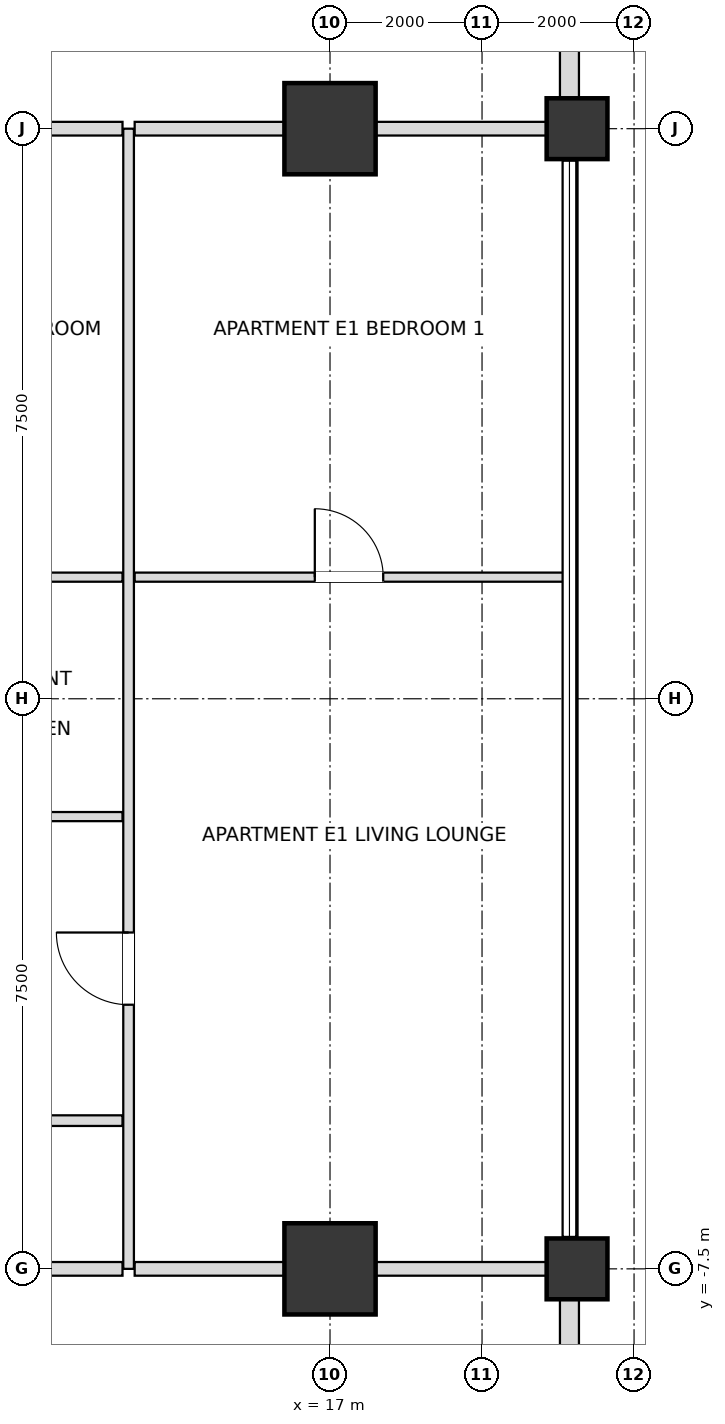
"""IFC4 building model, lengths in metres.
Left out: names, types, materials, properties, quantities, classifications, styles, units other than length and angle.
Written with IfcOpenShell. Run it as: python <this file> out.ifc"""

import sys

from ifc_helpers import new_model, si_unit, direction, frame, frame_2d, origin, origin_2d, place, context, subcontext, project, spatial, rectangle, extrude, element, fill, save


model = new_model("IFC4")
c1 = context("Model", 3, precision=1e-05, world=origin(), true_north=direction((0.0, 1.0)))
c2 = subcontext(c1, "Body", "Model", "MODEL_VIEW")
j1 = project(units=[si_unit("LENGTHUNIT", "METRE"), si_unit("PLANEANGLEUNIT", "RADIAN")], contexts=[c1])
p1 = place(None, origin())
s1 = spatial("IfcSite", under=j1, at=p1, CompositionType="ELEMENT")
p2 = place(p1, origin())
s2 = spatial("IfcBuilding", under=s1, at=p2, CompositionType="ELEMENT")
p3 = place(p2, frame((0.0, 0.0, 106.2)))
s3 = spatial("IfcBuildingStorey", under=s2, at=p3, CompositionType="ELEMENT", Elevation=106.2)
for number, where, z_axis, x_axis in (
    (1, (17.0, -7.5, 0.0), (0.0, 0.0, 1.0), (1.0, 0.0, 0.0)),
    (2, (17.0, 7.5, 0.0), (0.0, 0.0, 1.0), (1.0, 0.0, 0.0)),
):
    element("IfcColumn", number, at=place(p3, frame(where, z_axis=z_axis, x_axis=x_axis)), inside=s3, PredefinedType="USERDEFINED", context=c2, shape_type="SweptSolid", body=[
        extrude(rectangle(XDim=1.2, YDim=1.2, at=origin_2d()), origin(), (0.0, 0.0, 1.0), 3.6),
    ])
for number, where, z_axis, x_axis in (
    (3, (20.25, -7.5, 0.0), (0.0, 0.0, 1.0), (1.0, 0.0, 0.0)),
    (4, (20.25, 7.5, 0.0), (0.0, 0.0, 1.0), (1.0, 0.0, 0.0)),
):
    element("IfcColumn", number, at=place(p3, frame(where, z_axis=z_axis, x_axis=x_axis)), inside=s3, PredefinedType="COLUMN", context=c2, shape_type="SweptSolid", body=[
        extrude(rectangle(XDim=0.8, YDim=0.8, at=origin_2d()), origin(), (0.0, 0.0, 1.0), 3.6),
    ])
p4 = place(p3, frame((20.15, -12.605, 0.0), z_axis=(0.0, 0.0, 1.0), x_axis=(0.0, 1.0, 0.0)))
e5 = element("IfcWall", 5, at=p4, inside=s3, PredefinedType="SOLIDWALL", context=c2, shape_type="SweptSolid", body=[
    extrude(rectangle(XDim=4.71, YDim=0.25, at=frame_2d((2.355, 0.0))), origin(), (0.0, 0.0, 1.0), 2.736),
])
p5 = place(p4, frame((1.455, 0.0, 0.72)))
e6 = element("IfcOpeningElement", 6, at=p5, cuts=e5, PredefinedType="OPENING", context=c2, shape_type="SweptSolid", body=[
    extrude(rectangle(XDim=1.8, YDim=1.68, at=frame_2d((0.9, 0.84))), frame((0.0, 0.135, 0.0), z_axis=(0.0, -1.0, 0.0), x_axis=(1.0, 0.0, 0.0)), (0.0, 0.0, 1.0), 0.27),
])
p6 = place(p3, frame((20.15, 7.895, 0.0), z_axis=(0.0, 0.0, 1.0), x_axis=(0.0, 1.0, 0.0)))
e7 = element("IfcWall", 7, at=p6, inside=s3, PredefinedType="SOLIDWALL", context=c2, shape_type="SweptSolid", body=[
    extrude(rectangle(XDim=4.71, YDim=0.25, at=frame_2d((2.355, 0.0))), origin(), (0.0, 0.0, 1.0), 2.736),
])
p7 = place(p6, frame((1.455, 0.0, 0.72)))
e8 = element("IfcOpeningElement", 8, at=p7, cuts=e7, PredefinedType="OPENING", context=c2, shape_type="SweptSolid", body=[
    extrude(rectangle(XDim=1.8, YDim=1.68, at=frame_2d((0.9, 0.84))), frame((0.0, 0.135, 0.0), z_axis=(0.0, -1.0, 0.0), x_axis=(1.0, 0.0, 0.0)), (0.0, 0.0, 1.0), 0.27),
])
p8 = place(p3, frame((14.35, -7.5, 0.0), z_axis=(0.0, 0.0, 1.0), x_axis=(0.0, 1.0, 0.0)))
e9 = element("IfcWall", 9, at=p8, inside=s3, PredefinedType="PARTITIONING", context=c2, shape_type="SweptSolid", body=[
    extrude(rectangle(XDim=15.0, YDim=0.14, at=frame_2d((7.5, 0.0))), origin(), (0.0, 0.0, 1.0), 3.38),
])
p9 = place(p8, frame((3.475, 0.0, 0.0)))
e10 = element("IfcOpeningElement", 10, at=p9, cuts=e9, PredefinedType="OPENING", context=c2, shape_type="SweptSolid", body=[
    extrude(rectangle(XDim=0.95, YDim=2.1, at=frame_2d((0.475, 1.05))), frame((0.0, 0.08, 0.0), z_axis=(0.0, -1.0, 0.0), x_axis=(1.0, 0.0, 0.0)), (0.0, 0.0, 1.0), 0.16),
])
p10 = place(p3, frame((8.38, -7.5, 0.0), z_axis=(0.0, 0.0, 1.0), x_axis=(1.0, 0.0, 0.0)))
e11 = element("IfcWall", 11, at=p10, inside=s3, PredefinedType="PARTITIONING", context=c2, shape_type="SweptSolid", body=[
    extrude(rectangle(XDim=5.89, YDim=0.18, at=frame_2d((2.945, 0.0))), origin(), (0.0, 0.0, 1.0), 2.816),
])
p11 = place(p3, frame((14.43, -7.5, 0.0), z_axis=(0.0, 0.0, 1.0), x_axis=(1.0, 0.0, 0.0)))
e12 = element("IfcWall", 12, at=p11, inside=s3, PredefinedType="PARTITIONING", context=c2, shape_type="SweptSolid", body=[
    extrude(rectangle(XDim=5.72, YDim=0.18, at=frame_2d((2.86, 0.0))), origin(), (0.0, 0.0, 1.0), 2.816),
])
p12 = place(p3, frame((8.38, -5.55, 0.0), z_axis=(0.0, 0.0, 1.0), x_axis=(1.0, 0.0, 0.0)))
e13 = element("IfcWall", 13, at=p12, inside=s3, PredefinedType="PARTITIONING", context=c2, shape_type="SweptSolid", body=[
    extrude(rectangle(XDim=5.89, YDim=0.14, at=frame_2d((2.945, 0.0))), origin(), (0.0, 0.0, 1.0), 3.38),
])
p13 = place(p12, frame((2.49, 0.0, 0.0)))
e14 = element("IfcOpeningElement", 14, at=p13, cuts=e13, PredefinedType="OPENING", context=c2, shape_type="SweptSolid", body=[
    extrude(rectangle(XDim=0.9, YDim=2.1, at=frame_2d((0.45, 1.05))), frame((0.0, 0.08, 0.0), z_axis=(0.0, -1.0, 0.0), x_axis=(1.0, 0.0, 0.0)), (0.0, 0.0, 1.0), 0.16),
])
p14 = place(p3, frame((8.38, -1.55, 0.0), z_axis=(0.0, 0.0, 1.0), x_axis=(1.0, 0.0, 0.0)))
e15 = element("IfcWall", 15, at=p14, inside=s3, PredefinedType="PARTITIONING", context=c2, shape_type="SweptSolid", body=[
    extrude(rectangle(XDim=5.89, YDim=0.12, at=frame_2d((2.945, 0.0))), origin(), (0.0, 0.0, 1.0), 3.38),
])
p15 = place(p14, frame((2.465, 0.0, 0.0)))
e16 = element("IfcOpeningElement", 16, at=p15, cuts=e15, PredefinedType="OPENING", context=c2, shape_type="SweptSolid", body=[
    extrude(rectangle(XDim=0.95, YDim=2.1, at=frame_2d((0.475, 1.05))), frame((0.0, 0.07, 0.0), z_axis=(0.0, -1.0, 0.0), x_axis=(1.0, 0.0, 0.0)), (0.0, 0.0, 1.0), 0.14),
])
p16 = place(p3, frame((8.38, 1.6, 0.0), z_axis=(0.0, 0.0, 1.0), x_axis=(1.0, 0.0, 0.0)))
e17 = element("IfcWall", 17, at=p16, inside=s3, PredefinedType="PARTITIONING", context=c2, shape_type="SweptSolid", body=[
    extrude(rectangle(XDim=5.89, YDim=0.12, at=frame_2d((2.945, 0.0))), origin(), (0.0, 0.0, 1.0), 3.38),
])
p17 = place(p16, frame((2.49, 0.0, 0.0)))
e18 = element("IfcOpeningElement", 18, at=p17, cuts=e17, PredefinedType="OPENING", context=c2, shape_type="SweptSolid", body=[
    extrude(rectangle(XDim=0.9, YDim=2.1, at=frame_2d((0.45, 1.05))), frame((0.0, 0.07, 0.0), z_axis=(0.0, -1.0, 0.0), x_axis=(1.0, 0.0, 0.0)), (0.0, 0.0, 1.0), 0.14),
])
p18 = place(p3, frame((14.43, 1.6, 0.0), z_axis=(0.0, 0.0, 1.0), x_axis=(1.0, 0.0, 0.0)))
e19 = element("IfcWall", 19, at=p18, inside=s3, PredefinedType="PARTITIONING", context=c2, shape_type="SweptSolid", body=[
    extrude(rectangle(XDim=5.64, YDim=0.12, at=frame_2d((2.82, 0.0))), origin(), (0.0, 0.0, 1.0), 2.816),
])
p19 = place(p18, frame((2.37, 0.0, 0.0)))
e20 = element("IfcOpeningElement", 20, at=p19, cuts=e19, PredefinedType="OPENING", context=c2, shape_type="SweptSolid", body=[
    extrude(rectangle(XDim=0.9, YDim=2.1, at=frame_2d((0.45, 1.05))), frame((0.0, 0.07, 0.0), z_axis=(0.0, -1.0, 0.0), x_axis=(1.0, 0.0, 0.0)), (0.0, 0.0, 1.0), 0.14),
])
p20 = place(p3, frame((8.38, 7.5, 0.0), z_axis=(0.0, 0.0, 1.0), x_axis=(1.0, 0.0, 0.0)))
e21 = element("IfcWall", 21, at=p20, inside=s3, PredefinedType="PARTITIONING", context=c2, shape_type="SweptSolid", body=[
    extrude(rectangle(XDim=5.89, YDim=0.18, at=frame_2d((2.945, 0.0))), origin(), (0.0, 0.0, 1.0), 2.816),
])
p21 = place(p3, frame((14.43, 7.5, 0.0), z_axis=(0.0, 0.0, 1.0), x_axis=(1.0, 0.0, 0.0)))
e22 = element("IfcWall", 22, at=p21, inside=s3, PredefinedType="PARTITIONING", context=c2, shape_type="SweptSolid", body=[
    extrude(rectangle(XDim=5.72, YDim=0.18, at=frame_2d((2.86, 0.0))), origin(), (0.0, 0.0, 1.0), 2.816),
])
p22 = place(p9, origin())
e23 = element("IfcDoor", 23, at=p22, inside=s3, OperationType="SINGLE_SWING_RIGHT", PredefinedType="DOOR", context=c2, shape_type="SweptSolid", body=[
    extrude(rectangle(XDim=0.95, YDim=2.1, at=frame_2d((0.475, 1.05))), frame((0.0, 0.025, 0.0), z_axis=(0.0, -1.0, 0.0), x_axis=(1.0, 0.0, 0.0)), (0.0, 0.0, 1.0), 0.05),
])
fill(e10, e23)
p23 = place(p19, origin())
e24 = element("IfcDoor", 24, at=p23, inside=s3, OperationType="SINGLE_SWING_LEFT", PredefinedType="DOOR", context=c2, shape_type="SweptSolid", body=[
    extrude(rectangle(XDim=0.9, YDim=2.1, at=frame_2d((0.45, 1.05))), frame((0.0, 0.025, 0.0), z_axis=(0.0, -1.0, 0.0), x_axis=(1.0, 0.0, 0.0)), (0.0, 0.0, 1.0), 0.05),
])
fill(e20, e24)
save(model, sys.argv[1])
